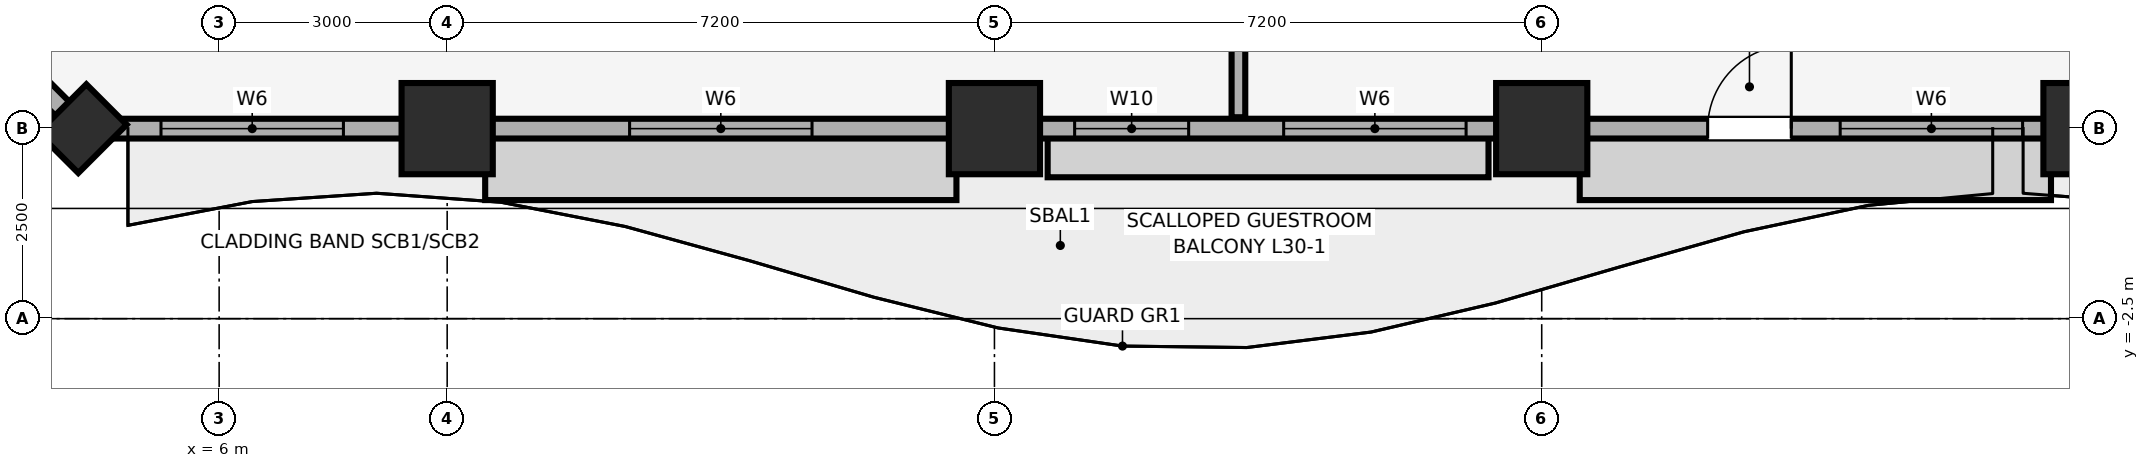
"""IFC4 building model, lengths in metres.
Left out: names, types, materials, properties, quantities, classifications, styles, units other than length and angle.
Written with IfcOpenShell. Run it as: python <this file> out.ifc"""

import sys

from ifc_helpers import new_model, si_unit, direction, frame, frame_2d, origin, origin_2d, place, context, subcontext, project, spatial, rectangle, extrude, element, fill, save


model = new_model("IFC4")
c1 = context("Model", 3, precision=1e-05, world=origin(), true_north=direction((0.0, 1.0)))
c2 = subcontext(c1, "Body", "Model", "MODEL_VIEW")
j1 = project(units=[si_unit("LENGTHUNIT", "METRE"), si_unit("PLANEANGLEUNIT", "RADIAN")], contexts=[c1])
p1 = place(None, origin())
s1 = spatial("IfcSite", under=j1, at=p1, CompositionType="ELEMENT")
p2 = place(p1, origin())
s2 = spatial("IfcBuilding", under=s1, at=p2, CompositionType="ELEMENT")
p3 = place(p2, frame((0.0, 0.0, 126.8)))
s3 = spatial("IfcBuildingStorey", under=s2, at=p3, CompositionType="ELEMENT", Elevation=126.8)
for number, where, z_axis, x_axis in (
    (1, (9.0, 0.0, 0.0), (0.0, 0.0, 1.0), (1.0, 0.0, 0.0)),
    (2, (16.2, 0.0, 0.0), (0.0, 0.0, 1.0), (1.0, 0.0, 0.0)),
    (3, (23.4, 0.0, 0.0), (0.0, 0.0, 1.0), (1.0, 0.0, 0.0)),
    (4, (30.6, 0.0, 0.0), (0.0, 0.0, 1.0), (1.0, 0.0, 0.0)),
):
    element("IfcColumn", number, at=place(p3, frame(where, z_axis=z_axis, x_axis=x_axis)), inside=s3, PredefinedType="COLUMN", context=c2, shape_type="SweptSolid", body=[
        extrude(rectangle(XDim=1.2, YDim=1.2, at=origin_2d()), origin(), (0.0, 0.0, 1.0), 3.51),
    ])
p4 = place(p3, frame((4.2, 0.0, 0.0), z_axis=(0.0, 0.0, 1.0), x_axis=(0.707106781187, 0.707106781187, 0.0)))
e5 = element("IfcColumn", 5, at=p4, inside=s3, PredefinedType="PILASTER", context=c2, shape_type="SweptSolid", body=[
    extrude(rectangle(XDim=0.9, YDim=0.75, at=origin_2d()), origin(), (0.0, 0.0, 1.0), 3.51),
])
p5 = place(p3, frame((4.2, 0.0, 0.0), z_axis=(0.0, 0.0, 1.0), x_axis=(1.0, 0.0, 0.0)))
e6 = element("IfcWall", 6, at=p5, inside=s3, PredefinedType="SOLIDWALL", context=c2, shape_type="SweptSolid", body=[
    extrude(rectangle(XDim=75.6, YDim=0.26, at=frame_2d((37.8, 0.0))), origin(), (0.0, 0.0, 1.0), 2.56),
])
p6 = place(p5, frame((21.383, 0.0, 0.0)))
e7 = element("IfcOpeningElement", 7, at=p6, cuts=e6, PredefinedType="OPENING", context=c2, shape_type="SweptSolid", body=[
    extrude(rectangle(XDim=1.1, YDim=2.15, at=frame_2d((0.55, 1.075))), frame((0.0, 0.14, 0.0), z_axis=(0.0, -1.0, 0.0), x_axis=(1.0, 0.0, 0.0)), (0.0, 0.0, 1.0), 0.28),
])
p7 = place(p5, frame((36.432, 0.0, 0.0)))
e8 = element("IfcOpeningElement", 8, at=p7, cuts=e6, PredefinedType="OPENING", context=c2, shape_type="SweptSolid", body=[
    extrude(rectangle(XDim=1.1, YDim=2.15, at=frame_2d((0.55, 1.075))), frame((0.0, 0.14, 0.0), z_axis=(0.0, -1.0, 0.0), x_axis=(1.0, 0.0, 0.0)), (0.0, 0.0, 1.0), 0.28),
])
p8 = place(p5, frame((58.094, 0.0, 0.0)))
e9 = element("IfcOpeningElement", 9, at=p8, cuts=e6, PredefinedType="OPENING", context=c2, shape_type="SweptSolid", body=[
    extrude(rectangle(XDim=1.1, YDim=2.15, at=frame_2d((0.55, 1.075))), frame((0.0, 0.14, 0.0), z_axis=(0.0, -1.0, 0.0), x_axis=(1.0, 0.0, 0.0)), (0.0, 0.0, 1.0), 0.28),
])
p9 = place(p5, frame((1.035, 0.0, 0.85)))
e10 = element("IfcOpeningElement", 10, at=p9, cuts=e6, PredefinedType="OPENING", context=c2, shape_type="SweptSolid", body=[
    extrude(rectangle(XDim=2.4, YDim=1.5, at=frame_2d((1.2, 0.75))), frame((0.0, 0.14, 0.0), z_axis=(0.0, -1.0, 0.0), x_axis=(1.0, 0.0, 0.0)), (0.0, 0.0, 1.0), 0.28),
])
p10 = place(p5, frame((7.2, 0.0, 0.85)))
e11 = element("IfcOpeningElement", 11, at=p10, cuts=e6, PredefinedType="OPENING", context=c2, shape_type="SweptSolid", body=[
    extrude(rectangle(XDim=2.4, YDim=1.5, at=frame_2d((1.2, 0.75))), frame((0.0, 0.14, 0.0), z_axis=(0.0, -1.0, 0.0), x_axis=(1.0, 0.0, 0.0)), (0.0, 0.0, 1.0), 0.28),
])
p11 = place(p5, frame((13.055, 0.0, 0.85)))
e12 = element("IfcOpeningElement", 12, at=p11, cuts=e6, PredefinedType="OPENING", context=c2, shape_type="SweptSolid", body=[
    extrude(rectangle(XDim=1.5, YDim=1.4, at=frame_2d((0.75, 0.7))), frame((0.0, 0.14, 0.0), z_axis=(0.0, -1.0, 0.0), x_axis=(1.0, 0.0, 0.0)), (0.0, 0.0, 1.0), 0.28),
])
p12 = place(p5, frame((15.805, 0.0, 0.85)))
e13 = element("IfcOpeningElement", 13, at=p12, cuts=e6, PredefinedType="OPENING", context=c2, shape_type="SweptSolid", body=[
    extrude(rectangle(XDim=2.4, YDim=1.5, at=frame_2d((1.2, 0.75))), frame((0.0, 0.14, 0.0), z_axis=(0.0, -1.0, 0.0), x_axis=(1.0, 0.0, 0.0)), (0.0, 0.0, 1.0), 0.28),
])
p13 = place(p5, frame((23.127, 0.0, 0.85)))
e14 = element("IfcOpeningElement", 14, at=p13, cuts=e6, PredefinedType="OPENING", context=c2, shape_type="SweptSolid", body=[
    extrude(rectangle(XDim=2.4, YDim=1.5, at=frame_2d((1.2, 0.75))), frame((0.0, 0.14, 0.0), z_axis=(0.0, -1.0, 0.0), x_axis=(1.0, 0.0, 0.0)), (0.0, 0.0, 1.0), 0.28),
])
p14 = place(p5, frame((27.285, 0.0, 0.85)))
e15 = element("IfcOpeningElement", 15, at=p14, cuts=e6, PredefinedType="OPENING", context=c2, shape_type="SweptSolid", body=[
    extrude(rectangle(XDim=2.4, YDim=1.5, at=frame_2d((1.2, 0.75))), frame((0.0, 0.14, 0.0), z_axis=(0.0, -1.0, 0.0), x_axis=(1.0, 0.0, 0.0)), (0.0, 0.0, 1.0), 0.28),
])
p15 = place(p5, frame((30.935, 0.0, 0.85)))
e16 = element("IfcOpeningElement", 16, at=p15, cuts=e6, PredefinedType="OPENING", context=c2, shape_type="SweptSolid", body=[
    extrude(rectangle(XDim=1.5, YDim=1.4, at=frame_2d((0.75, 0.7))), frame((0.0, 0.14, 0.0), z_axis=(0.0, -1.0, 0.0), x_axis=(1.0, 0.0, 0.0)), (0.0, 0.0, 1.0), 0.28),
])
p16 = place(p5, frame((38.451, 0.0, 0.85)))
e17 = element("IfcOpeningElement", 17, at=p16, cuts=e6, PredefinedType="OPENING", context=c2, shape_type="SweptSolid", body=[
    extrude(rectangle(XDim=2.4, YDim=1.5, at=frame_2d((1.2, 0.75))), frame((0.0, 0.14, 0.0), z_axis=(0.0, -1.0, 0.0), x_axis=(1.0, 0.0, 0.0)), (0.0, 0.0, 1.0), 0.28),
])
p17 = place(p5, frame((43.115, 0.0, 0.85)))
e18 = element("IfcOpeningElement", 18, at=p17, cuts=e6, PredefinedType="OPENING", context=c2, shape_type="SweptSolid", body=[
    extrude(rectangle(XDim=1.5, YDim=1.4, at=frame_2d((0.75, 0.7))), frame((0.0, 0.14, 0.0), z_axis=(0.0, -1.0, 0.0), x_axis=(1.0, 0.0, 0.0)), (0.0, 0.0, 1.0), 0.28),
])
p18 = place(p5, frame((45.865, 0.0, 0.85)))
e19 = element("IfcOpeningElement", 19, at=p18, cuts=e6, PredefinedType="OPENING", context=c2, shape_type="SweptSolid", body=[
    extrude(rectangle(XDim=2.4, YDim=1.5, at=frame_2d((1.2, 0.75))), frame((0.0, 0.14, 0.0), z_axis=(0.0, -1.0, 0.0), x_axis=(1.0, 0.0, 0.0)), (0.0, 0.0, 1.0), 0.28),
])
p19 = place(p5, frame((51.6, 0.0, 0.85)))
e20 = element("IfcOpeningElement", 20, at=p19, cuts=e6, PredefinedType="OPENING", context=c2, shape_type="SweptSolid", body=[
    extrude(rectangle(XDim=2.4, YDim=1.5, at=frame_2d((1.2, 0.75))), frame((0.0, 0.14, 0.0), z_axis=(0.0, -1.0, 0.0), x_axis=(1.0, 0.0, 0.0)), (0.0, 0.0, 1.0), 0.28),
])
p20 = place(p5, frame((61.095, 0.0, 0.85)))
e21 = element("IfcOpeningElement", 21, at=p20, cuts=e6, PredefinedType="OPENING", context=c2, shape_type="SweptSolid", body=[
    extrude(rectangle(XDim=1.5, YDim=1.4, at=frame_2d((0.75, 0.7))), frame((0.0, 0.14, 0.0), z_axis=(0.0, -1.0, 0.0), x_axis=(1.0, 0.0, 0.0)), (0.0, 0.0, 1.0), 0.28),
])
p21 = place(p5, frame((66.0, 0.0, 0.85)))
e22 = element("IfcOpeningElement", 22, at=p21, cuts=e6, PredefinedType="OPENING", context=c2, shape_type="SweptSolid", body=[
    extrude(rectangle(XDim=2.4, YDim=1.5, at=frame_2d((1.2, 0.75))), frame((0.0, 0.14, 0.0), z_axis=(0.0, -1.0, 0.0), x_axis=(1.0, 0.0, 0.0)), (0.0, 0.0, 1.0), 0.28),
])
p22 = place(p5, frame((72.165, 0.0, 0.85)))
e23 = element("IfcOpeningElement", 23, at=p22, cuts=e6, PredefinedType="OPENING", context=c2, shape_type="SweptSolid", body=[
    extrude(rectangle(XDim=2.4, YDim=1.5, at=frame_2d((1.2, 0.75))), frame((0.0, 0.14, 0.0), z_axis=(0.0, -1.0, 0.0), x_axis=(1.0, 0.0, 0.0)), (0.0, 0.0, 1.0), 0.28),
])
p23 = place(p3, frame((0.0, 4.2, 0.0), z_axis=(0.0, 0.0, 1.0), x_axis=(0.707106781187, -0.707106781187, 0.0)))
e24 = element("IfcWall", 24, at=p23, inside=s3, PredefinedType="SOLIDWALL", context=c2, shape_type="SweptSolid", body=[
    extrude(rectangle(XDim=5.94, YDim=0.26, at=frame_2d((2.97, 0.0))), origin(), (0.0, 0.0, 1.0), 2.56),
])
p24 = place(p3, frame((19.41, 0.15, 0.0), z_axis=(0.0, 0.0, 1.0), x_axis=(0.0, 1.0, 0.0)))
e25 = element("IfcWall", 25, at=p24, inside=s3, PredefinedType="PARTITIONING", context=c2, shape_type="SweptSolid", body=[
    extrude(rectangle(XDim=24.555, YDim=0.18, at=frame_2d((12.278, 0.0))), origin(), (0.0, 0.0, 1.0), 3.51),
])
p25 = place(p6, origin())
e26 = element("IfcDoor", 26, at=p25, inside=s3, OperationType="SINGLE_SWING_RIGHT", PredefinedType="DOOR", context=c2, shape_type="SweptSolid", body=[
    extrude(rectangle(XDim=1.1, YDim=2.15, at=frame_2d((0.55, 1.075))), frame((0.0, 0.025, 0.0), z_axis=(0.0, -1.0, 0.0), x_axis=(1.0, 0.0, 0.0)), (0.0, 0.0, 1.0), 0.05),
])
fill(e7, e26)
p26 = place(p9, origin())
e27 = element("IfcWindow", 27, at=p26, inside=s3, PartitioningType="SINGLE_PANEL", PredefinedType="WINDOW", context=c2, shape_type="SweptSolid", body=[
    extrude(rectangle(XDim=2.4, YDim=1.5, at=frame_2d((1.2, 0.75))), frame((0.0, 0.03, 0.0), z_axis=(0.0, -1.0, 0.0), x_axis=(1.0, 0.0, 0.0)), (0.0, 0.0, 1.0), 0.06),
])
fill(e10, e27)
p27 = place(p10, origin())
e28 = element("IfcWindow", 28, at=p27, inside=s3, PartitioningType="SINGLE_PANEL", PredefinedType="WINDOW", context=c2, shape_type="SweptSolid", body=[
    extrude(rectangle(XDim=2.4, YDim=1.5, at=frame_2d((1.2, 0.75))), frame((0.0, 0.03, 0.0), z_axis=(0.0, -1.0, 0.0), x_axis=(1.0, 0.0, 0.0)), (0.0, 0.0, 1.0), 0.06),
])
fill(e11, e28)
p28 = place(p11, origin())
e29 = element("IfcWindow", 29, at=p28, inside=s3, PartitioningType="SINGLE_PANEL", PredefinedType="WINDOW", context=c2, shape_type="SweptSolid", body=[
    extrude(rectangle(XDim=1.5, YDim=1.4, at=frame_2d((0.75, 0.7))), frame((0.0, 0.03, 0.0), z_axis=(0.0, -1.0, 0.0), x_axis=(1.0, 0.0, 0.0)), (0.0, 0.0, 1.0), 0.06),
])
fill(e12, e29)
p29 = place(p12, origin())
e30 = element("IfcWindow", 30, at=p29, inside=s3, PartitioningType="SINGLE_PANEL", PredefinedType="WINDOW", context=c2, shape_type="SweptSolid", body=[
    extrude(rectangle(XDim=2.4, YDim=1.5, at=frame_2d((1.2, 0.75))), frame((0.0, 0.03, 0.0), z_axis=(0.0, -1.0, 0.0), x_axis=(1.0, 0.0, 0.0)), (0.0, 0.0, 1.0), 0.06),
])
fill(e13, e30)
p30 = place(p13, origin())
e31 = element("IfcWindow", 31, at=p30, inside=s3, PartitioningType="SINGLE_PANEL", PredefinedType="WINDOW", context=c2, shape_type="SweptSolid", body=[
    extrude(rectangle(XDim=2.4, YDim=1.5, at=frame_2d((1.2, 0.75))), frame((0.0, 0.03, 0.0), z_axis=(0.0, -1.0, 0.0), x_axis=(1.0, 0.0, 0.0)), (0.0, 0.0, 1.0), 0.06),
])
fill(e14, e31)
save(model, sys.argv[1])
